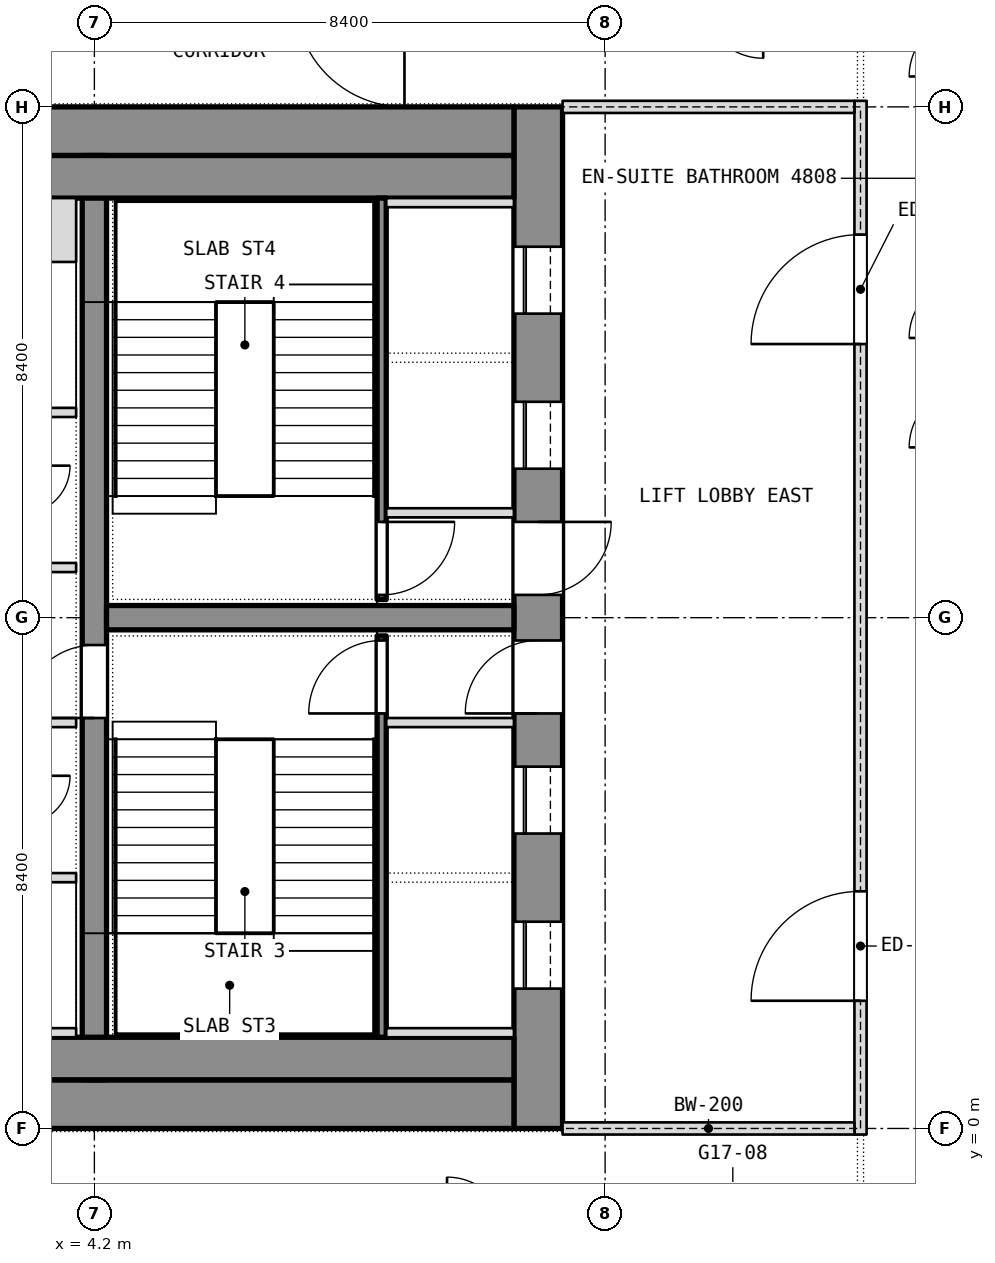
"""IFC4 building model, lengths in metres.
Left out: names, types, materials, properties, quantities, classifications, styles, units other than length and angle.
Written with IfcOpenShell. Run it as: python <this file> out.ifc"""

import sys

from ifc_helpers import new_model, si_unit, direction, frame, frame_2d, origin, place, context, subcontext, project, spatial, rectangle, extrude, element, fill, save


model = new_model("IFC4")
c1 = context("Model", 3, precision=1e-05, world=origin(), true_north=direction((0.0, 1.0)))
c2 = subcontext(c1, "Body", "Model", "MODEL_VIEW")
j1 = project(units=[si_unit("LENGTHUNIT", "METRE"), si_unit("PLANEANGLEUNIT", "RADIAN")], contexts=[c1])
p1 = place(None, origin())
s1 = spatial("IfcSite", under=j1, at=p1, CompositionType="ELEMENT")
p2 = place(p1, origin())
s2 = spatial("IfcBuilding", under=s1, at=p2, CompositionType="ELEMENT")
p3 = place(p2, frame((0.0, 0.0, 209.3)))
s3 = spatial("IfcBuildingStorey", under=s2, at=p3, CompositionType="ELEMENT", Elevation=209.3)
p4 = place(p3, frame((11.5, 0.0, 0.0), z_axis=(0.0, 0.0, 1.0), x_axis=(0.0, 1.0, 0.0)))
e1 = element("IfcWall", 1, at=p4, inside=s3, PredefinedType="SHEAR", context=c2, shape_type="SweptSolid", body=[
    extrude(rectangle(XDim=16.8, YDim=0.8, at=frame_2d((8.4, 0.0))), origin(), (0.0, 0.0, 1.0), 3.6),
])
p5 = place(p4, frame((2.3, 0.0, 0.0)))
e2 = element("IfcOpeningElement", 2, at=p5, cuts=e1, PredefinedType="OPENING", context=c2, shape_type="SweptSolid", body=[
    extrude(rectangle(XDim=1.1, YDim=2.1, at=frame_2d((0.55, 1.05))), frame((0.0, 0.4, 0.0), z_axis=(0.0, -1.0, 0.0), x_axis=(1.0, 0.0, 0.0)), (0.0, 0.0, 1.0), 0.8),
])
p6 = place(p4, frame((4.85, 0.0, 0.0)))
e3 = element("IfcOpeningElement", 3, at=p6, cuts=e1, PredefinedType="OPENING", context=c2, shape_type="SweptSolid", body=[
    extrude(rectangle(XDim=1.1, YDim=2.1, at=frame_2d((0.55, 1.05))), frame((0.0, 0.4, 0.0), z_axis=(0.0, -1.0, 0.0), x_axis=(1.0, 0.0, 0.0)), (0.0, 0.0, 1.0), 0.8),
])
p7 = place(p4, frame((6.825, 0.0, 0.0)))
e4 = element("IfcOpeningElement", 4, at=p7, cuts=e1, PredefinedType="OPENING", context=c2, shape_type="SweptSolid", body=[
    extrude(rectangle(XDim=1.2, YDim=2.1, at=frame_2d((0.6, 1.05))), frame((0.0, 0.4, 0.0), z_axis=(0.0, -1.0, 0.0), x_axis=(1.0, 0.0, 0.0)), (0.0, 0.0, 1.0), 0.8),
])
p8 = place(p4, frame((13.4, 0.0, 0.0)))
e5 = element("IfcOpeningElement", 5, at=p8, cuts=e1, PredefinedType="OPENING", context=c2, shape_type="SweptSolid", body=[
    extrude(rectangle(XDim=1.1, YDim=2.1, at=frame_2d((0.55, 1.05))), frame((0.0, 0.4, 0.0), z_axis=(0.0, -1.0, 0.0), x_axis=(1.0, 0.0, 0.0)), (0.0, 0.0, 1.0), 0.8),
])
p9 = place(p4, frame((10.85, 0.0, 0.0)))
e6 = element("IfcOpeningElement", 6, at=p9, cuts=e1, PredefinedType="OPENING", context=c2, shape_type="SweptSolid", body=[
    extrude(rectangle(XDim=1.1, YDim=2.1, at=frame_2d((0.55, 1.05))), frame((0.0, 0.4, 0.0), z_axis=(0.0, -1.0, 0.0), x_axis=(1.0, 0.0, 0.0)), (0.0, 0.0, 1.0), 0.8),
])
p10 = place(p4, frame((8.775, 0.0, 0.0)))
e7 = element("IfcOpeningElement", 7, at=p10, cuts=e1, PredefinedType="OPENING", context=c2, shape_type="SweptSolid", body=[
    extrude(rectangle(XDim=1.2, YDim=2.1, at=frame_2d((0.6, 1.05))), frame((0.0, 0.4, 0.0), z_axis=(0.0, -1.0, 0.0), x_axis=(1.0, 0.0, 0.0)), (0.0, 0.0, 1.0), 0.8),
])
for number, where, z_axis, x_axis in (
    (8, (-11.1, 0.4, 0.0), (0.0, 0.0, 1.0), (1.0, 0.0, 0.0)),
    (9, (-11.1, 16.4, 0.0), (0.0, 0.0, 1.0), (1.0, 0.0, 0.0)),
):
    element("IfcWall", number, at=place(p3, frame(where, z_axis=z_axis, x_axis=x_axis)), inside=s3, PredefinedType="SHEAR", context=c2, shape_type="SweptSolid", body=[
        extrude(rectangle(XDim=22.2, YDim=0.8, at=frame_2d((11.1, 0.0))), origin(), (0.0, 0.0, 1.0), 3.6),
    ])
p11 = place(p3, frame((4.2, 0.8, 0.0), z_axis=(0.0, 0.0, 1.0), x_axis=(0.0, 1.0, 0.0)))
e10 = element("IfcWall", 10, at=p11, inside=s3, PredefinedType="SHEAR", context=c2, shape_type="SweptSolid", body=[
    extrude(rectangle(XDim=15.2, YDim=0.4, at=frame_2d((7.6, 0.0))), origin(), (0.0, 0.0, 1.0), 3.6),
])
p12 = place(p11, frame((5.95, 0.0, 0.0)))
e11 = element("IfcOpeningElement", 11, at=p12, cuts=e10, PredefinedType="OPENING", context=c2, shape_type="SweptSolid", body=[
    extrude(rectangle(XDim=1.2, YDim=2.1, at=frame_2d((0.6, 1.05))), frame((0.0, 0.2, 0.0), z_axis=(0.0, -1.0, 0.0), x_axis=(1.0, 0.0, 0.0)), (0.0, 0.0, 1.0), 0.4),
])
p13 = place(p3, frame((4.4, 8.4, 0.0), z_axis=(0.0, 0.0, 1.0), x_axis=(1.0, 0.0, 0.0)))
e12 = element("IfcWall", 12, at=p13, inside=s3, PredefinedType="SHEAR", context=c2, shape_type="SweptSolid", body=[
    extrude(rectangle(XDim=6.7, YDim=0.4, at=frame_2d((3.35, 0.0))), origin(), (0.0, 0.0, 1.0), 3.6),
])
for number, where, z_axis, x_axis in (
    (13, (-11.1, 1.15, 0.0), (0.0, 0.0, 1.0), (1.0, 0.0, 0.0)),
    (14, (-11.1, 15.65, 0.0), (0.0, 0.0, 1.0), (1.0, 0.0, 0.0)),
):
    element("IfcWall", number, at=place(p3, frame(where, z_axis=z_axis, x_axis=x_axis)), inside=s3, PredefinedType="PARTITIONING", context=c2, shape_type="SweptSolid", body=[
        extrude(rectangle(XDim=22.2, YDim=0.7, at=frame_2d((11.1, 0.0))), origin(), (0.0, 0.0, 1.0), 3.34),
    ])
p14 = place(p3, frame((8.925, 1.5, 0.0), z_axis=(0.0, 0.0, 1.0), x_axis=(0.0, 1.0, 0.0)))
e15 = element("IfcWall", 15, at=p14, inside=s3, PredefinedType="SHEAR", context=c2, shape_type="SweptSolid", body=[
    extrude(rectangle(XDim=6.6, YDim=0.15, at=frame_2d((3.3, 0.0))), origin(), (0.0, 0.0, 1.0), 3.34),
])
p15 = place(p14, frame((5.325, 0.0, 0.0)))
e16 = element("IfcOpeningElement", 16, at=p15, cuts=e15, PredefinedType="OPENING", context=c2, shape_type="SweptSolid", body=[
    extrude(rectangle(XDim=1.2, YDim=2.1, at=frame_2d((0.6, 1.05))), frame((0.0, 0.075, 0.0), z_axis=(0.0, -1.0, 0.0), x_axis=(1.0, 0.0, 0.0)), (0.0, 0.0, 1.0), 0.15),
])
for number, where, z_axis, x_axis in (
    (17, (9.0, 6.675, 0.0), (0.0, 0.0, 1.0), (1.0, 0.0, 0.0)),
    (18, (9.0, 1.575, 0.0), (0.0, 0.0, 1.0), (1.0, 0.0, 0.0)),
):
    element("IfcWall", number, at=place(p3, frame(where, z_axis=z_axis, x_axis=x_axis)), inside=s3, PredefinedType="SHEAR", context=c2, shape_type="SweptSolid", body=[
        extrude(rectangle(XDim=2.1, YDim=0.15, at=frame_2d((1.05, 0.0))), origin(), (0.0, 0.0, 1.0), 3.6),
    ])
p16 = place(p3, frame((8.925, 8.7, 0.0), z_axis=(0.0, 0.0, 1.0), x_axis=(0.0, 1.0, 0.0)))
e19 = element("IfcWall", 19, at=p16, inside=s3, PredefinedType="SHEAR", context=c2, shape_type="SweptSolid", body=[
    extrude(rectangle(XDim=6.6, YDim=0.15, at=frame_2d((3.3, 0.0))), origin(), (0.0, 0.0, 1.0), 3.34),
])
p17 = place(p16, frame((0.075, 0.0, 0.0)))
e20 = element("IfcOpeningElement", 20, at=p17, cuts=e19, PredefinedType="OPENING", context=c2, shape_type="SweptSolid", body=[
    extrude(rectangle(XDim=1.2, YDim=2.1, at=frame_2d((0.6, 1.05))), frame((0.0, 0.075, 0.0), z_axis=(0.0, -1.0, 0.0), x_axis=(1.0, 0.0, 0.0)), (0.0, 0.0, 1.0), 0.15),
])
for number, where, z_axis, x_axis in (
    (21, (9.0, 10.125, 0.0), (0.0, 0.0, 1.0), (1.0, 0.0, 0.0)),
    (22, (9.0, 15.225, 0.0), (0.0, 0.0, 1.0), (1.0, 0.0, 0.0)),
):
    element("IfcWall", number, at=place(p3, frame(where, z_axis=z_axis, x_axis=x_axis)), inside=s3, PredefinedType="SHEAR", context=c2, shape_type="SweptSolid", body=[
        extrude(rectangle(XDim=2.1, YDim=0.15, at=frame_2d((1.05, 0.0))), origin(), (0.0, 0.0, 1.0), 3.6),
    ])
p18 = place(p3, frame((-3.9, 4.125, 0.0), z_axis=(0.0, 0.0, 1.0), x_axis=(1.0, 0.0, 0.0)))
e23 = element("IfcWall", 23, at=p18, inside=s3, PredefinedType="PARTITIONING", context=c2, shape_type="SweptSolid", body=[
    extrude(rectangle(XDim=7.8, YDim=0.15, at=frame_2d((3.9, 0.0))), origin(), (0.0, 0.0, 1.0), 3.34),
])
p19 = place(p18, frame((3.75, 0.0, 0.0)))
e24 = element("IfcOpeningElement", 24, at=p19, cuts=e23, PredefinedType="OPENING", context=c2, shape_type="SweptSolid", body=[
    extrude(rectangle(XDim=1.2, YDim=2.1, at=frame_2d((0.6, 1.05))), frame((0.0, 0.075, 0.0), z_axis=(0.0, -1.0, 0.0), x_axis=(1.0, 0.0, 0.0)), (0.0, 0.0, 1.0), 0.15),
])
p20 = place(p3, frame((-3.9, 11.775, 0.0), z_axis=(0.0, 0.0, 1.0), x_axis=(1.0, 0.0, 0.0)))
e25 = element("IfcWall", 25, at=p20, inside=s3, PredefinedType="PARTITIONING", context=c2, shape_type="SweptSolid", body=[
    extrude(rectangle(XDim=7.8, YDim=0.15, at=frame_2d((3.9, 0.0))), origin(), (0.0, 0.0, 1.0), 3.34),
])
p21 = place(p20, frame((3.3, 0.0, 0.0)))
e26 = element("IfcOpeningElement", 26, at=p21, cuts=e25, PredefinedType="OPENING", context=c2, shape_type="SweptSolid", body=[
    extrude(rectangle(XDim=1.2, YDim=2.1, at=frame_2d((0.6, 1.05))), frame((0.0, 0.075, 0.0), z_axis=(0.0, -1.0, 0.0), x_axis=(1.0, 0.0, 0.0)), (0.0, 0.0, 1.0), 0.15),
])
p22 = place(p3, frame((1.65, 1.575, 0.0), z_axis=(0.0, 0.0, 1.0), x_axis=(1.0, 0.0, 0.0)))
e27 = element("IfcWall", 27, at=p22, inside=s3, PredefinedType="SHEAR", context=c2, shape_type="SweptSolid", body=[
    extrude(rectangle(XDim=2.25, YDim=0.15, at=frame_2d((1.125, 0.0))), origin(), (0.0, 0.0, 1.0), 3.6),
])
p23 = place(p3, frame((1.65, 14.775, 0.0), z_axis=(0.0, 0.0, 1.0), x_axis=(1.0, 0.0, 0.0)))
e28 = element("IfcWall", 28, at=p23, inside=s3, PredefinedType="SHEAR", context=c2, shape_type="SweptSolid", body=[
    extrude(rectangle(XDim=2.25, YDim=1.05, at=frame_2d((1.125, 0.0))), origin(), (0.0, 0.0, 1.0), 3.6),
])
for number, where, z_axis, x_axis in (
    (29, (1.65, 6.675, 0.0), (0.0, 0.0, 1.0), (1.0, 0.0, 0.0)),
    (30, (1.65, 9.225, 0.0), (0.0, 0.0, 1.0), (1.0, 0.0, 0.0)),
):
    element("IfcWall", number, at=place(p3, frame(where, z_axis=z_axis, x_axis=x_axis)), inside=s3, PredefinedType="PARTITIONING", context=c2, shape_type="SweptSolid", body=[
        extrude(rectangle(XDim=2.25, YDim=0.15, at=frame_2d((1.125, 0.0))), origin(), (0.0, 0.0, 1.0), 3.34),
    ])
p24 = place(p3, frame((16.8, -0.1, 0.0), z_axis=(0.0, 0.0, 1.0), x_axis=(0.0, 1.0, 0.0)))
e31 = element("IfcWall", 31, at=p24, inside=s3, PredefinedType="PARTITIONING", context=c2, shape_type="SweptSolid", body=[
    extrude(rectangle(XDim=17.0, YDim=0.2, at=frame_2d((8.5, 0.0))), origin(), (0.0, 0.0, 1.0), 3.34),
])
p25 = place(p24, frame((2.2, 0.0, 0.0)))
e32 = element("IfcOpeningElement", 32, at=p25, cuts=e31, PredefinedType="OPENING", context=c2, shape_type="SweptSolid", body=[
    extrude(rectangle(XDim=1.8, YDim=2.1, at=frame_2d((0.9, 1.05))), frame((0.0, 0.1, 0.0), z_axis=(0.0, -1.0, 0.0), x_axis=(1.0, 0.0, 0.0)), (0.0, 0.0, 1.0), 0.2),
])
p26 = place(p24, frame((13.0, 0.0, 0.0)))
e33 = element("IfcOpeningElement", 33, at=p26, cuts=e31, PredefinedType="OPENING", context=c2, shape_type="SweptSolid", body=[
    extrude(rectangle(XDim=1.8, YDim=2.1, at=frame_2d((0.9, 1.05))), frame((0.0, 0.1, 0.0), z_axis=(0.0, -1.0, 0.0), x_axis=(1.0, 0.0, 0.0)), (0.0, 0.0, 1.0), 0.2),
])
for number, where, z_axis, x_axis in (
    (34, (11.9, 0.0, 0.0), (0.0, 0.0, 1.0), (1.0, 0.0, 0.0)),
    (35, (11.9, 16.8, 0.0), (0.0, 0.0, 1.0), (1.0, 0.0, 0.0)),
):
    element("IfcWall", number, at=place(p3, frame(where, z_axis=z_axis, x_axis=x_axis)), inside=s3, PredefinedType="PARTITIONING", context=c2, shape_type="SweptSolid", body=[
        extrude(rectangle(XDim=4.8, YDim=0.2, at=frame_2d((2.4, 0.0))), origin(), (0.0, 0.0, 1.0), 2.94),
    ])
p27 = place(p5, origin())
e36 = element("IfcDoor", 36, at=p27, inside=s3, OperationType="SLIDING_TO_LEFT", PredefinedType="DOOR", context=c2, shape_type="SweptSolid", body=[
    extrude(rectangle(XDim=1.1, YDim=2.1, at=frame_2d((0.55, 1.05))), frame((0.0, 0.025, 0.0), z_axis=(0.0, -1.0, 0.0), x_axis=(1.0, 0.0, 0.0)), (0.0, 0.0, 1.0), 0.05),
])
fill(e2, e36)
p28 = place(p6, origin())
e37 = element("IfcDoor", 37, at=p28, inside=s3, OperationType="SLIDING_TO_LEFT", PredefinedType="DOOR", context=c2, shape_type="SweptSolid", body=[
    extrude(rectangle(XDim=1.1, YDim=2.1, at=frame_2d((0.55, 1.05))), frame((0.0, 0.025, 0.0), z_axis=(0.0, -1.0, 0.0), x_axis=(1.0, 0.0, 0.0)), (0.0, 0.0, 1.0), 0.05),
])
fill(e3, e37)
p29 = place(p7, origin())
e38 = element("IfcDoor", 38, at=p29, inside=s3, OperationType="SINGLE_SWING_LEFT", PredefinedType="DOOR", context=c2, shape_type="SweptSolid", body=[
    extrude(rectangle(XDim=1.2, YDim=2.1, at=frame_2d((0.6, 1.05))), frame((0.0, 0.025, 0.0), z_axis=(0.0, -1.0, 0.0), x_axis=(1.0, 0.0, 0.0)), (0.0, 0.0, 1.0), 0.05),
])
fill(e4, e38)
p30 = place(p15, origin())
e39 = element("IfcDoor", 39, at=p30, inside=s3, OperationType="SINGLE_SWING_LEFT", PredefinedType="DOOR", context=c2, shape_type="SweptSolid", body=[
    extrude(rectangle(XDim=1.2, YDim=2.1, at=frame_2d((0.6, 1.05))), frame((0.0, 0.025, 0.0), z_axis=(0.0, -1.0, 0.0), x_axis=(1.0, 0.0, 0.0)), (0.0, 0.0, 1.0), 0.05),
])
fill(e16, e39)
p31 = place(p8, origin())
e40 = element("IfcDoor", 40, at=p31, inside=s3, OperationType="SLIDING_TO_LEFT", PredefinedType="DOOR", context=c2, shape_type="SweptSolid", body=[
    extrude(rectangle(XDim=1.1, YDim=2.1, at=frame_2d((0.55, 1.05))), frame((0.0, 0.025, 0.0), z_axis=(0.0, -1.0, 0.0), x_axis=(1.0, 0.0, 0.0)), (0.0, 0.0, 1.0), 0.05),
])
fill(e5, e40)
p32 = place(p9, origin())
e41 = element("IfcDoor", 41, at=p32, inside=s3, OperationType="SLIDING_TO_LEFT", PredefinedType="DOOR", context=c2, shape_type="SweptSolid", body=[
    extrude(rectangle(XDim=1.1, YDim=2.1, at=frame_2d((0.55, 1.05))), frame((0.0, 0.025, 0.0), z_axis=(0.0, -1.0, 0.0), x_axis=(1.0, 0.0, 0.0)), (0.0, 0.0, 1.0), 0.05),
])
fill(e6, e41)
p33 = place(p10, origin())
e42 = element("IfcDoor", 42, at=p33, inside=s3, OperationType="SINGLE_SWING_LEFT", PredefinedType="DOOR", context=c2, shape_type="SweptSolid", body=[
    extrude(rectangle(XDim=1.2, YDim=2.1, at=frame_2d((0.6, 1.05))), frame((0.0, 0.025, 0.0), z_axis=(0.0, -1.0, 0.0), x_axis=(1.0, 0.0, 0.0)), (0.0, 0.0, 1.0), 0.05),
])
fill(e7, e42)
p34 = place(p17, origin())
e43 = element("IfcDoor", 43, at=p34, inside=s3, OperationType="SINGLE_SWING_LEFT", PredefinedType="DOOR", context=c2, shape_type="SweptSolid", body=[
    extrude(rectangle(XDim=1.2, YDim=2.1, at=frame_2d((0.6, 1.05))), frame((0.0, 0.025, 0.0), z_axis=(0.0, -1.0, 0.0), x_axis=(1.0, 0.0, 0.0)), (0.0, 0.0, 1.0), 0.05),
])
fill(e20, e43)
p35 = place(p12, origin())
e44 = element("IfcDoor", 44, at=p35, inside=s3, OperationType="SINGLE_SWING_LEFT", PredefinedType="DOOR", context=c2, shape_type="SweptSolid", body=[
    extrude(rectangle(XDim=1.2, YDim=2.1, at=frame_2d((0.6, 1.05))), frame((0.0, 0.025, 0.0), z_axis=(0.0, -1.0, 0.0), x_axis=(1.0, 0.0, 0.0)), (0.0, 0.0, 1.0), 0.05),
])
fill(e11, e44)
p36 = place(p25, origin())
e45 = element("IfcDoor", 45, at=p36, inside=s3, OperationType="DOUBLE_DOOR_SINGLE_SWING", PredefinedType="DOOR", context=c2, shape_type="SweptSolid", body=[
    extrude(rectangle(XDim=1.8, YDim=2.1, at=frame_2d((0.9, 1.05))), frame((0.0, 0.025, 0.0), z_axis=(0.0, -1.0, 0.0), x_axis=(1.0, 0.0, 0.0)), (0.0, 0.0, 1.0), 0.05),
])
fill(e32, e45)
p37 = place(p26, origin())
e46 = element("IfcDoor", 46, at=p37, inside=s3, OperationType="DOUBLE_DOOR_SINGLE_SWING", PredefinedType="DOOR", context=c2, shape_type="SweptSolid", body=[
    extrude(rectangle(XDim=1.8, YDim=2.1, at=frame_2d((0.9, 1.05))), frame((0.0, 0.025, 0.0), z_axis=(0.0, -1.0, 0.0), x_axis=(1.0, 0.0, 0.0)), (0.0, 0.0, 1.0), 0.05),
])
fill(e33, e46)
save(model, sys.argv[1])
